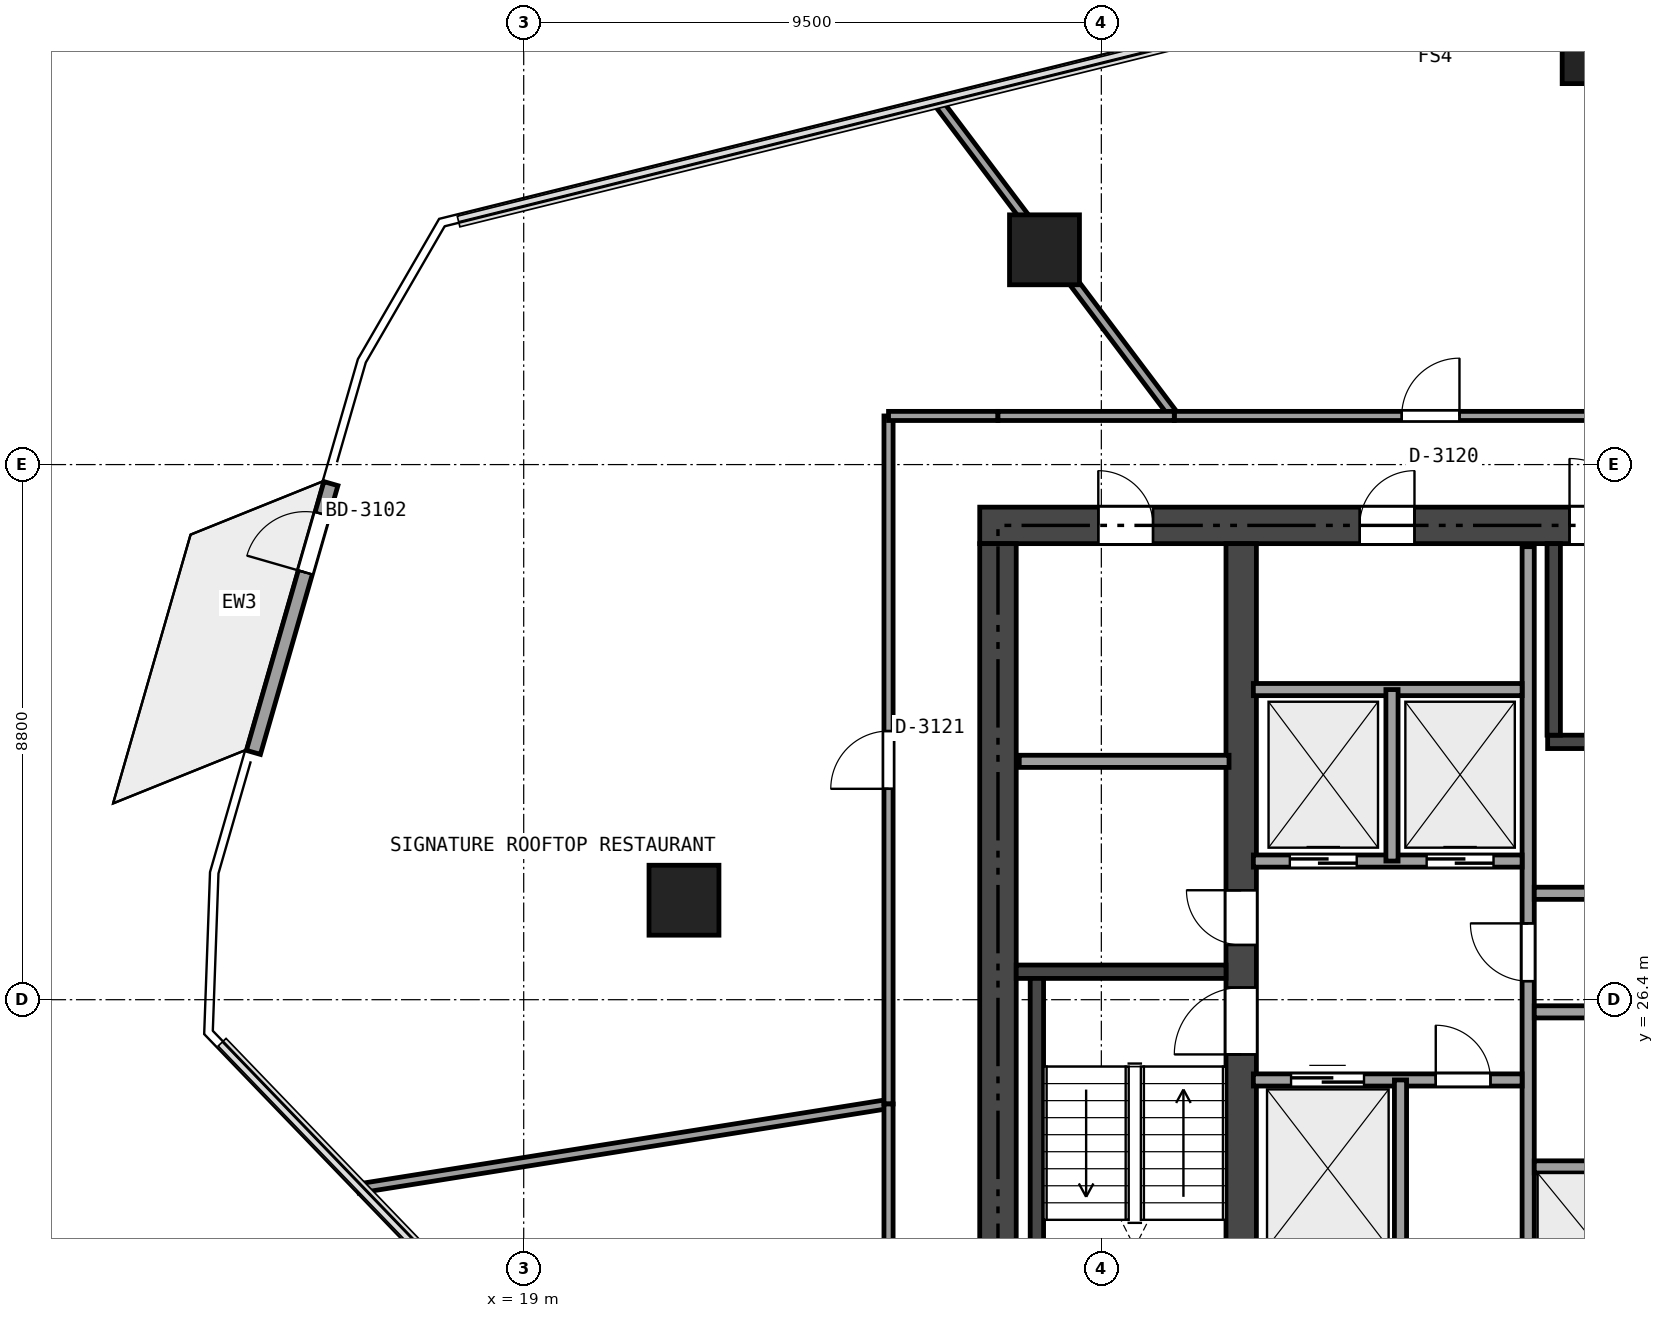
"""IFC4 building model, lengths in metres.
Left out: names, types, materials, properties, quantities, classifications, styles, units other than length and angle.
Written with IfcOpenShell. Run it as: python <this file> out.ifc"""

import sys

from ifc_helpers import new_model, si_unit, direction, frame, frame_2d, origin, origin_2d, place, context, subcontext, project, spatial, rectangle, extrude, element, fill, save


model = new_model("IFC4")
c1 = context("Model", 3, precision=1e-05, world=origin(), true_north=direction((0.0, 1.0)))
c2 = subcontext(c1, "Body", "Model", "MODEL_VIEW")
j1 = project(units=[si_unit("LENGTHUNIT", "METRE"), si_unit("PLANEANGLEUNIT", "RADIAN")], contexts=[c1])
p1 = place(None, origin())
s1 = spatial("IfcSite", under=j1, at=p1, CompositionType="ELEMENT")
p2 = place(p1, origin())
s2 = spatial("IfcBuilding", under=s1, at=p2, CompositionType="ELEMENT")
p3 = place(p2, frame((0.0, 0.0, 117.75)))
s3 = spatial("IfcBuildingStorey", under=s2, at=p3, CompositionType="ELEMENT", Elevation=117.75)
p4 = place(p3, frame((26.5, 34.2, 0.0), z_axis=(0.0, 0.0, 1.0), x_axis=(1.0, 0.0, 0.0)))
e1 = element("IfcWall", 1, at=p4, inside=s3, PredefinedType="SHEAR", context=c2, shape_type="SweptSolid", body=[
    extrude(rectangle(XDim=21.4, YDim=0.6, at=frame_2d((10.7, 0.0))), origin(), (0.0, 0.0, 1.0), 3.09),
])
p5 = place(p4, frame((9.7, 0.0, 0.0)))
e2 = element("IfcOpeningElement", 2, at=p5, cuts=e1, PredefinedType="OPENING", context=c2, shape_type="SweptSolid", body=[
    extrude(rectangle(XDim=1.1, YDim=2.15, at=frame_2d((0.55, 1.075))), frame((0.0, 0.31, 0.0), z_axis=(0.0, -1.0, 0.0), x_axis=(1.0, 0.0, 0.0)), (0.0, 0.0, 1.0), 0.62),
])
p6 = place(p4, frame((1.95, 0.0, 0.0)))
e3 = element("IfcOpeningElement", 3, at=p6, cuts=e1, PredefinedType="OPENING", context=c2, shape_type="SweptSolid", body=[
    extrude(rectangle(XDim=0.9, YDim=2.1, at=frame_2d((0.45, 1.05))), frame((0.0, 0.31, 0.0), z_axis=(0.0, -1.0, 0.0), x_axis=(1.0, 0.0, 0.0)), (0.0, 0.0, 1.0), 0.62),
])
p7 = place(p4, frame((6.25, 0.0, 0.0)))
e4 = element("IfcOpeningElement", 4, at=p7, cuts=e1, PredefinedType="OPENING", context=c2, shape_type="SweptSolid", body=[
    extrude(rectangle(XDim=0.9, YDim=2.1, at=frame_2d((0.45, 1.05))), frame((0.0, 0.31, 0.0), z_axis=(0.0, -1.0, 0.0), x_axis=(1.0, 0.0, 0.0)), (0.0, 0.0, 1.0), 0.62),
])
p8 = place(p3, frame((26.8, 18.9, 0.0), z_axis=(0.0, 0.0, 1.0), x_axis=(0.0, 1.0, 0.0)))
e5 = element("IfcWall", 5, at=p8, inside=s3, PredefinedType="SHEAR", context=c2, shape_type="SweptSolid", body=[
    extrude(rectangle(XDim=15.0, YDim=0.6, at=frame_2d((7.5, 0.0))), origin(), (0.0, 0.0, 1.0), 3.09),
])
p9 = place(p3, frame((30.8, 18.9, 0.0), z_axis=(0.0, 0.0, 1.0), x_axis=(0.0, 1.0, 0.0)))
e6 = element("IfcWall", 6, at=p9, inside=s3, PredefinedType="SHEAR", context=c2, shape_type="SweptSolid", body=[
    extrude(rectangle(XDim=15.0, YDim=0.5, at=frame_2d((7.5, 0.0))), origin(), (0.0, 0.0, 1.0), 3.09),
])
p10 = place(p9, frame((6.6, 0.0, 0.0)))
e7 = element("IfcOpeningElement", 7, at=p10, cuts=e6, PredefinedType="OPENING", context=c2, shape_type="SweptSolid", body=[
    extrude(rectangle(XDim=1.1, YDim=2.15, at=frame_2d((0.55, 1.075))), frame((0.0, 0.26, 0.0), z_axis=(0.0, -1.0, 0.0), x_axis=(1.0, 0.0, 0.0)), (0.0, 0.0, 1.0), 0.52),
])
p11 = place(p9, frame((8.4, 0.0, 0.0)))
e8 = element("IfcOpeningElement", 8, at=p11, cuts=e6, PredefinedType="OPENING", context=c2, shape_type="SweptSolid", body=[
    extrude(rectangle(XDim=0.9, YDim=2.1, at=frame_2d((0.45, 1.05))), frame((0.0, 0.26, 0.0), z_axis=(0.0, -1.0, 0.0), x_axis=(1.0, 0.0, 0.0)), (0.0, 0.0, 1.0), 0.52),
])
p12 = place(p3, frame((27.1, 26.86, 0.0), z_axis=(0.0, 0.0, 1.0), x_axis=(1.0, 0.0, 0.0)))
e9 = element("IfcWall", 9, at=p12, inside=s3, PredefinedType="SHEAR", context=c2, shape_type="SweptSolid", body=[
    extrude(rectangle(XDim=3.45, YDim=0.22, at=frame_2d((1.725, 0.0))), origin(), (0.0, 0.0, 1.0), 3.09),
])
p13 = place(p3, frame((27.44, 19.35, 0.0), z_axis=(0.0, 0.0, 1.0), x_axis=(0.0, 1.0, 0.0)))
e10 = element("IfcWall", 10, at=p13, inside=s3, PredefinedType="SHEAR", context=c2, shape_type="SweptSolid", body=[
    extrude(rectangle(XDim=7.4, YDim=0.22, at=frame_2d((3.7, 0.0))), origin(), (0.0, 0.0, 1.0), 3.09),
])
p14 = place(p3, frame((35.84, 30.64, 0.0), z_axis=(0.0, 0.0, 1.0), x_axis=(1.0, 0.0, 0.0)))
e11 = element("IfcWall", 11, at=p14, inside=s3, PredefinedType="SHEAR", context=c2, shape_type="SweptSolid", body=[
    extrude(rectangle(XDim=7.61, YDim=0.22, at=frame_2d((3.805, 0.0))), origin(), (0.0, 0.0, 1.0), 3.09),
])
p15 = place(p3, frame((35.94, 30.75, 0.0), z_axis=(0.0, 0.0, 1.0), x_axis=(0.0, 1.0, 0.0)))
e12 = element("IfcWall", 12, at=p15, inside=s3, PredefinedType="SHEAR", context=c2, shape_type="SweptSolid", body=[
    extrude(rectangle(XDim=3.15, YDim=0.22, at=frame_2d((1.575, 0.0))), origin(), (0.0, 0.0, 1.0), 3.09),
])
for number, where, z_axis, x_axis in (
    (13, (36.654, 42.04, 0.0), (0.0, 0.0, 1.0), (1.0, 0.0, 0.0)),
    (14, (27.565, 38.732, 0.0), (0.0, 0.0, 1.0), (1.0, 0.0, 0.0)),
    (15, (21.636, 28.036, 0.0), (0.0, 0.0, 1.0), (1.0, 0.0, 0.0)),
):
    element("IfcColumn", number, at=place(p3, frame(where, z_axis=z_axis, x_axis=x_axis)), inside=s3, PredefinedType="COLUMN", context=c2, shape_type="SweptSolid", body=[
        extrude(rectangle(XDim=1.15, YDim=1.15, at=origin_2d()), origin(), (0.0, 0.0, 1.0), 3.09),
    ])
p16 = place(p3, frame((14.555, 30.467, 0.0), z_axis=(0.0, 0.0, 1.0), x_axis=(0.276998577349, 0.960870328477, 0.0)))
e16 = element("IfcWall", 16, at=p16, inside=s3, PredefinedType="SOLIDWALL", context=c2, shape_type="SweptSolid", body=[
    extrude(rectangle(XDim=4.6, YDim=0.24, at=frame_2d((2.3, 0.0))), origin(), (0.0, 0.0, 1.0), 3.09),
])
p17 = place(p16, frame((3.08, 0.0, 0.0)))
e17 = element("IfcOpeningElement", 17, at=p17, cuts=e16, PredefinedType="OPENING", context=c2, shape_type="SweptSolid", body=[
    extrude(rectangle(XDim=1.0, YDim=2.15, at=frame_2d((0.5, 1.075))), frame((0.0, 0.13, 0.0), z_axis=(0.0, -1.0, 0.0), x_axis=(1.0, 0.0, 0.0)), (0.0, 0.0, 1.0), 0.26),
])
p18 = place(p3, frame((27.15, 30.32, 0.0), z_axis=(0.0, 0.0, 1.0), x_axis=(1.0, 0.0, 0.0)))
e18 = element("IfcWall", 18, at=p18, inside=s3, PredefinedType="SOLIDWALL", context=c2, shape_type="SweptSolid", body=[
    extrude(rectangle(XDim=3.45, YDim=0.2, at=frame_2d((1.725, 0.0))), origin(), (0.0, 0.0, 1.0), 3.09),
])
p19 = place(p3, frame((35.52, 18.95, 0.0), z_axis=(0.0, 0.0, 1.0), x_axis=(0.0, 1.0, 0.0)))
e19 = element("IfcWall", 19, at=p19, inside=s3, PredefinedType="SOLIDWALL", context=c2, shape_type="SweptSolid", body=[
    extrude(rectangle(XDim=14.9, YDim=0.2, at=frame_2d((7.45, 0.0))), origin(), (0.0, 0.0, 1.0), 2.611),
])
p20 = place(p19, frame((7.755, 0.0, 0.0)))
e20 = element("IfcOpeningElement", 20, at=p20, cuts=e19, PredefinedType="OPENING", context=c2, shape_type="SweptSolid", body=[
    extrude(rectangle(XDim=0.95, YDim=2.15, at=frame_2d((0.475, 1.075))), frame((0.0, 0.11, 0.0), z_axis=(0.0, -1.0, 0.0), x_axis=(1.0, 0.0, 0.0)), (0.0, 0.0, 1.0), 0.22),
])
p21 = place(p19, frame((0.6, 0.0, 0.0)))
e21 = element("IfcOpeningElement", 21, at=p21, cuts=e19, PredefinedType="OPENING", context=c2, shape_type="SweptSolid", body=[
    extrude(rectangle(XDim=0.9, YDim=2.1, at=frame_2d((0.45, 1.05))), frame((0.0, 0.11, 0.0), z_axis=(0.0, -1.0, 0.0), x_axis=(1.0, 0.0, 0.0)), (0.0, 0.0, 1.0), 0.22),
])
p22 = place(p3, frame((31.0, 28.68, 0.0), z_axis=(0.0, 0.0, 1.0), x_axis=(1.0, 0.0, 0.0)))
e22 = element("IfcWall", 22, at=p22, inside=s3, PredefinedType="SOLIDWALL", context=c2, shape_type="SweptSolid", body=[
    extrude(rectangle(XDim=4.42, YDim=0.2, at=frame_2d((2.21, 0.0))), origin(), (0.0, 0.0, 1.0), 3.09),
])
p23 = place(p22, frame((0.6, 0.0, 0.0)))
e23 = element("IfcOpeningElement", 23, at=p23, cuts=e22, PredefinedType="OPENING", context=c2, shape_type="SweptSolid", body=[
    extrude(rectangle(XDim=1.1, YDim=2.15, at=frame_2d((0.55, 1.075))), frame((0.0, 0.11, 0.0), z_axis=(0.0, -1.0, 0.0), x_axis=(1.0, 0.0, 0.0)), (0.0, 0.0, 1.0), 0.22),
])
p24 = place(p22, frame((2.85, 0.0, 0.0)))
e24 = element("IfcOpeningElement", 24, at=p24, cuts=e22, PredefinedType="OPENING", context=c2, shape_type="SweptSolid", body=[
    extrude(rectangle(XDim=1.1, YDim=2.15, at=frame_2d((0.55, 1.075))), frame((0.0, 0.11, 0.0), z_axis=(0.0, -1.0, 0.0), x_axis=(1.0, 0.0, 0.0)), (0.0, 0.0, 1.0), 0.22),
])
p25 = place(p3, frame((31.0, 31.5, 0.0), z_axis=(0.0, 0.0, 1.0), x_axis=(1.0, 0.0, 0.0)))
e25 = element("IfcWall", 25, at=p25, inside=s3, PredefinedType="SOLIDWALL", context=c2, shape_type="SweptSolid", body=[
    extrude(rectangle(XDim=4.42, YDim=0.2, at=frame_2d((2.21, 0.0))), origin(), (0.0, 0.0, 1.0), 3.09),
])
p26 = place(p3, frame((33.28, 28.68, 0.0), z_axis=(0.0, 0.0, 1.0), x_axis=(0.0, 1.0, 0.0)))
e26 = element("IfcWall", 26, at=p26, inside=s3, PredefinedType="SOLIDWALL", context=c2, shape_type="SweptSolid", body=[
    extrude(rectangle(XDim=2.82, YDim=0.2, at=frame_2d((1.41, 0.0))), origin(), (0.0, 0.0, 1.0), 3.09),
])
p27 = place(p3, frame((31.0, 25.08, 0.0), z_axis=(0.0, 0.0, 1.0), x_axis=(1.0, 0.0, 0.0)))
e27 = element("IfcWall", 27, at=p27, inside=s3, PredefinedType="SOLIDWALL", context=c2, shape_type="SweptSolid", body=[
    extrude(rectangle(XDim=4.42, YDim=0.2, at=frame_2d((2.21, 0.0))), origin(), (0.0, 0.0, 1.0), 3.09),
])
p28 = place(p27, frame((3.0, 0.0, 0.0)))
e28 = element("IfcOpeningElement", 28, at=p28, cuts=e27, PredefinedType="OPENING", context=c2, shape_type="SweptSolid", body=[
    extrude(rectangle(XDim=0.9, YDim=2.1, at=frame_2d((0.45, 1.05))), frame((0.0, 0.11, 0.0), z_axis=(0.0, -1.0, 0.0), x_axis=(1.0, 0.0, 0.0)), (0.0, 0.0, 1.0), 0.22),
])
p29 = place(p27, frame((0.62, 0.0, 0.0)))
e29 = element("IfcOpeningElement", 29, at=p29, cuts=e27, PredefinedType="OPENING", context=c2, shape_type="SweptSolid", body=[
    extrude(rectangle(XDim=1.2, YDim=2.15, at=frame_2d((0.6, 1.075))), frame((0.0, 0.11, 0.0), z_axis=(0.0, -1.0, 0.0), x_axis=(1.0, 0.0, 0.0)), (0.0, 0.0, 1.0), 0.22),
])
p30 = place(p3, frame((33.42, 18.95, 0.0), z_axis=(0.0, 0.0, 1.0), x_axis=(0.0, 1.0, 0.0)))
e30 = element("IfcWall", 30, at=p30, inside=s3, PredefinedType="SOLIDWALL", context=c2, shape_type="SweptSolid", body=[
    extrude(rectangle(XDim=6.13, YDim=0.2, at=frame_2d((3.065, 0.0))), origin(), (0.0, 0.0, 1.0), 2.611),
])
for number, where, z_axis, x_axis in (
    (31, (35.62, 28.15, 0.0), (0.0, 0.0, 1.0), (1.0, 0.0, 0.0)),
    (32, (35.62, 26.2, 0.0), (0.0, 0.0, 1.0), (1.0, 0.0, 0.0)),
):
    element("IfcWall", number, at=place(p3, frame(where, z_axis=z_axis, x_axis=x_axis)), inside=s3, PredefinedType="SOLIDWALL", context=c2, shape_type="SweptSolid", body=[
        extrude(rectangle(XDim=7.88, YDim=0.2, at=frame_2d((3.94, 0.0))), origin(), (0.0, 0.0, 1.0), 3.09),
    ])
p31 = place(p3, frame((35.62, 23.65, 0.0), z_axis=(0.0, 0.0, 1.0), x_axis=(1.0, 0.0, 0.0)))
e33 = element("IfcWall", 33, at=p31, inside=s3, PredefinedType="SOLIDWALL", context=c2, shape_type="SweptSolid", body=[
    extrude(rectangle(XDim=7.88, YDim=0.2, at=frame_2d((3.94, 0.0))), origin(), (0.0, 0.0, 1.0), 2.611),
])
p32 = place(p3, frame((25.787, 41.193, 0.0), z_axis=(0.0, 0.0, 1.0), x_axis=(0.601770760845, -0.798668862165, 0.0)))
e34 = element("IfcWall", 34, at=p32, inside=s3, PredefinedType="PARTITIONING", context=c2, shape_type="SweptSolid", body=[
    extrude(rectangle(XDim=6.502, YDim=0.15, at=frame_2d((3.251, 0.0))), origin(), (0.0, 0.0, 1.0), 2.387),
])
p33 = place(p3, frame((29.7, 36.0, 0.0), z_axis=(0.0, 0.0, 1.0), x_axis=(1.0, 0.0, 0.0)))
e35 = element("IfcWall", 35, at=p33, inside=s3, PredefinedType="PARTITIONING", context=c2, shape_type="SweptSolid", body=[
    extrude(rectangle(XDim=8.43, YDim=0.15, at=frame_2d((4.215, 0.0))), origin(), (0.0, 0.0, 1.0), 2.387),
])
p34 = place(p33, frame((3.74, 0.0, 0.0)))
e36 = element("IfcOpeningElement", 36, at=p34, cuts=e35, PredefinedType="OPENING", context=c2, shape_type="SweptSolid", body=[
    extrude(rectangle(XDim=0.95, YDim=2.15, at=frame_2d((0.475, 1.075))), frame((0.0, 0.085, 0.0), z_axis=(0.0, -1.0, 0.0), x_axis=(1.0, 0.0, 0.0)), (0.0, 0.0, 1.0), 0.17),
])
p35 = place(p3, frame((16.281, 23.295, 0.0), z_axis=(0.0, 0.0, 1.0), x_axis=(0.987527105535, 0.157449089657, 0.0)))
e37 = element("IfcWall", 37, at=p35, inside=s3, PredefinedType="PARTITIONING", context=c2, shape_type="SweptSolid", body=[
    extrude(rectangle(XDim=8.829, YDim=0.15, at=frame_2d((4.415, 0.0))), origin(), (0.0, 0.0, 1.0), 2.375),
])
p36 = place(p3, frame((25.0, 24.685, 0.0), z_axis=(0.0, 0.0, 1.0), x_axis=(0.0, 1.0, 0.0)))
e38 = element("IfcWall", 38, at=p36, inside=s3, PredefinedType="PARTITIONING", context=c2, shape_type="SweptSolid", body=[
    extrude(rectangle(XDim=11.315, YDim=0.15, at=frame_2d((5.657, 0.0))), origin(), (0.0, 0.0, 1.0), 2.375),
])
p37 = place(p36, frame((5.183, 0.0, 0.0)))
e39 = element("IfcOpeningElement", 39, at=p37, cuts=e38, PredefinedType="OPENING", context=c2, shape_type="SweptSolid", body=[
    extrude(rectangle(XDim=0.95, YDim=2.15, at=frame_2d((0.475, 1.075))), frame((0.0, 0.085, 0.0), z_axis=(0.0, -1.0, 0.0), x_axis=(1.0, 0.0, 0.0)), (0.0, 0.0, 1.0), 0.17),
])
p38 = place(p3, frame((25.0, 36.0, 0.0), z_axis=(0.0, 0.0, 1.0), x_axis=(1.0, 0.0, 0.0)))
e40 = element("IfcWall", 40, at=p38, inside=s3, PredefinedType="PARTITIONING", context=c2, shape_type="SweptSolid", body=[
    extrude(rectangle(XDim=1.8, YDim=0.15, at=frame_2d((0.9, 0.0))), origin(), (0.0, 0.0, 1.0), 2.375),
])
p39 = place(p3, frame((26.8, 36.0, 0.0), z_axis=(0.0, 0.0, 1.0), x_axis=(1.0, 0.0, 0.0)))
e41 = element("IfcWall", 41, at=p39, inside=s3, PredefinedType="PARTITIONING", context=c2, shape_type="SweptSolid", body=[
    extrude(rectangle(XDim=2.9, YDim=0.15, at=frame_2d((1.45, 0.0))), origin(), (0.0, 0.0, 1.0), 2.387),
])
p40 = place(p3, frame((25.0, 18.6, 0.0), z_axis=(0.0, 0.0, 1.0), x_axis=(0.0, 1.0, 0.0)))
e42 = element("IfcWall", 42, at=p40, inside=s3, PredefinedType="PARTITIONING", context=c2, shape_type="SweptSolid", body=[
    extrude(rectangle(XDim=6.085, YDim=0.15, at=frame_2d((3.042, 0.0))), origin(), (0.0, 0.0, 1.0), 2.387),
])
p41 = place(p17, origin())
e43 = element("IfcDoor", 43, at=p41, inside=s3, OperationType="SINGLE_SWING_LEFT", PredefinedType="DOOR", context=c2, shape_type="SweptSolid", body=[
    extrude(rectangle(XDim=1.0, YDim=2.15, at=frame_2d((0.5, 1.075))), frame((0.0, 0.025, 0.0), z_axis=(0.0, -1.0, 0.0), x_axis=(1.0, 0.0, 0.0)), (0.0, 0.0, 1.0), 0.05),
])
fill(e17, e43)
p42 = place(p10, origin())
e44 = element("IfcDoor", 44, at=p42, inside=s3, OperationType="SINGLE_SWING_LEFT", PredefinedType="DOOR", context=c2, shape_type="SweptSolid", body=[
    extrude(rectangle(XDim=1.1, YDim=2.15, at=frame_2d((0.55, 1.075))), frame((0.0, 0.025, 0.0), z_axis=(0.0, -1.0, 0.0), x_axis=(1.0, 0.0, 0.0)), (0.0, 0.0, 1.0), 0.05),
])
fill(e7, e44)
p43 = place(p5, origin())
e45 = element("IfcDoor", 45, at=p43, inside=s3, OperationType="SINGLE_SWING_LEFT", PredefinedType="DOOR", context=c2, shape_type="SweptSolid", body=[
    extrude(rectangle(XDim=1.1, YDim=2.15, at=frame_2d((0.55, 1.075))), frame((0.0, 0.025, 0.0), z_axis=(0.0, -1.0, 0.0), x_axis=(1.0, 0.0, 0.0)), (0.0, 0.0, 1.0), 0.05),
])
fill(e2, e45)
p44 = place(p20, origin())
e46 = element("IfcDoor", 46, at=p44, inside=s3, OperationType="SINGLE_SWING_RIGHT", PredefinedType="DOOR", context=c2, shape_type="SweptSolid", body=[
    extrude(rectangle(XDim=0.95, YDim=2.15, at=frame_2d((0.475, 1.075))), frame((0.0, 0.025, 0.0), z_axis=(0.0, -1.0, 0.0), x_axis=(1.0, 0.0, 0.0)), (0.0, 0.0, 1.0), 0.05),
])
fill(e20, e46)
p45 = place(p11, origin())
e47 = element("IfcDoor", 47, at=p45, inside=s3, OperationType="SINGLE_SWING_RIGHT", PredefinedType="DOOR", context=c2, shape_type="SweptSolid", body=[
    extrude(rectangle(XDim=0.9, YDim=2.1, at=frame_2d((0.45, 1.05))), frame((0.0, 0.025, 0.0), z_axis=(0.0, -1.0, 0.0), x_axis=(1.0, 0.0, 0.0)), (0.0, 0.0, 1.0), 0.05),
])
fill(e8, e47)
p46 = place(p6, origin())
e48 = element("IfcDoor", 48, at=p46, inside=s3, OperationType="SINGLE_SWING_LEFT", PredefinedType="DOOR", context=c2, shape_type="SweptSolid", body=[
    extrude(rectangle(XDim=0.9, YDim=2.1, at=frame_2d((0.45, 1.05))), frame((0.0, 0.025, 0.0), z_axis=(0.0, -1.0, 0.0), x_axis=(1.0, 0.0, 0.0)), (0.0, 0.0, 1.0), 0.05),
])
fill(e3, e48)
p47 = place(p7, origin())
e49 = element("IfcDoor", 49, at=p47, inside=s3, OperationType="SINGLE_SWING_RIGHT", PredefinedType="DOOR", context=c2, shape_type="SweptSolid", body=[
    extrude(rectangle(XDim=0.9, YDim=2.1, at=frame_2d((0.45, 1.05))), frame((0.0, 0.025, 0.0), z_axis=(0.0, -1.0, 0.0), x_axis=(1.0, 0.0, 0.0)), (0.0, 0.0, 1.0), 0.05),
])
fill(e4, e49)
p48 = place(p28, origin())
e50 = element("IfcDoor", 50, at=p48, inside=s3, OperationType="SINGLE_SWING_LEFT", PredefinedType="DOOR", context=c2, shape_type="SweptSolid", body=[
    extrude(rectangle(XDim=0.9, YDim=2.1, at=frame_2d((0.45, 1.05))), frame((0.0, 0.025, 0.0), z_axis=(0.0, -1.0, 0.0), x_axis=(1.0, 0.0, 0.0)), (0.0, 0.0, 1.0), 0.05),
])
fill(e28, e50)
p49 = place(p23, origin())
e51 = element("IfcDoor", 51, at=p49, inside=s3, OperationType="SLIDING_TO_LEFT", PredefinedType="DOOR", context=c2, shape_type="SweptSolid", body=[
    extrude(rectangle(XDim=1.1, YDim=2.15, at=frame_2d((0.55, 1.075))), frame((0.0, 0.025, 0.0), z_axis=(0.0, -1.0, 0.0), x_axis=(1.0, 0.0, 0.0)), (0.0, 0.0, 1.0), 0.05),
])
fill(e23, e51)
p50 = place(p24, origin())
e52 = element("IfcDoor", 52, at=p50, inside=s3, OperationType="SLIDING_TO_LEFT", PredefinedType="DOOR", context=c2, shape_type="SweptSolid", body=[
    extrude(rectangle(XDim=1.1, YDim=2.15, at=frame_2d((0.55, 1.075))), frame((0.0, 0.025, 0.0), z_axis=(0.0, -1.0, 0.0), x_axis=(1.0, 0.0, 0.0)), (0.0, 0.0, 1.0), 0.05),
])
fill(e24, e52)
p51 = place(p29, origin())
e53 = element("IfcDoor", 53, at=p51, inside=s3, OperationType="SLIDING_TO_LEFT", PredefinedType="DOOR", context=c2, shape_type="SweptSolid", body=[
    extrude(rectangle(XDim=1.2, YDim=2.15, at=frame_2d((0.6, 1.075))), frame((0.0, 0.025, 0.0), z_axis=(0.0, -1.0, 0.0), x_axis=(1.0, 0.0, 0.0)), (0.0, 0.0, 1.0), 0.05),
])
fill(e29, e53)
p52 = place(p34, origin())
e54 = element("IfcDoor", 54, at=p52, inside=s3, OperationType="SINGLE_SWING_RIGHT", PredefinedType="DOOR", context=c2, shape_type="SweptSolid", body=[
    extrude(rectangle(XDim=0.95, YDim=2.15, at=frame_2d((0.475, 1.075))), frame((0.0, 0.025, 0.0), z_axis=(0.0, -1.0, 0.0), x_axis=(1.0, 0.0, 0.0)), (0.0, 0.0, 1.0), 0.05),
])
fill(e36, e54)
p53 = place(p37, origin())
e55 = element("IfcDoor", 55, at=p53, inside=s3, OperationType="SINGLE_SWING_LEFT", PredefinedType="DOOR", context=c2, shape_type="SweptSolid", body=[
    extrude(rectangle(XDim=0.95, YDim=2.15, at=frame_2d((0.475, 1.075))), frame((0.0, 0.025, 0.0), z_axis=(0.0, -1.0, 0.0), x_axis=(1.0, 0.0, 0.0)), (0.0, 0.0, 1.0), 0.05),
])
fill(e39, e55)
save(model, sys.argv[1])
